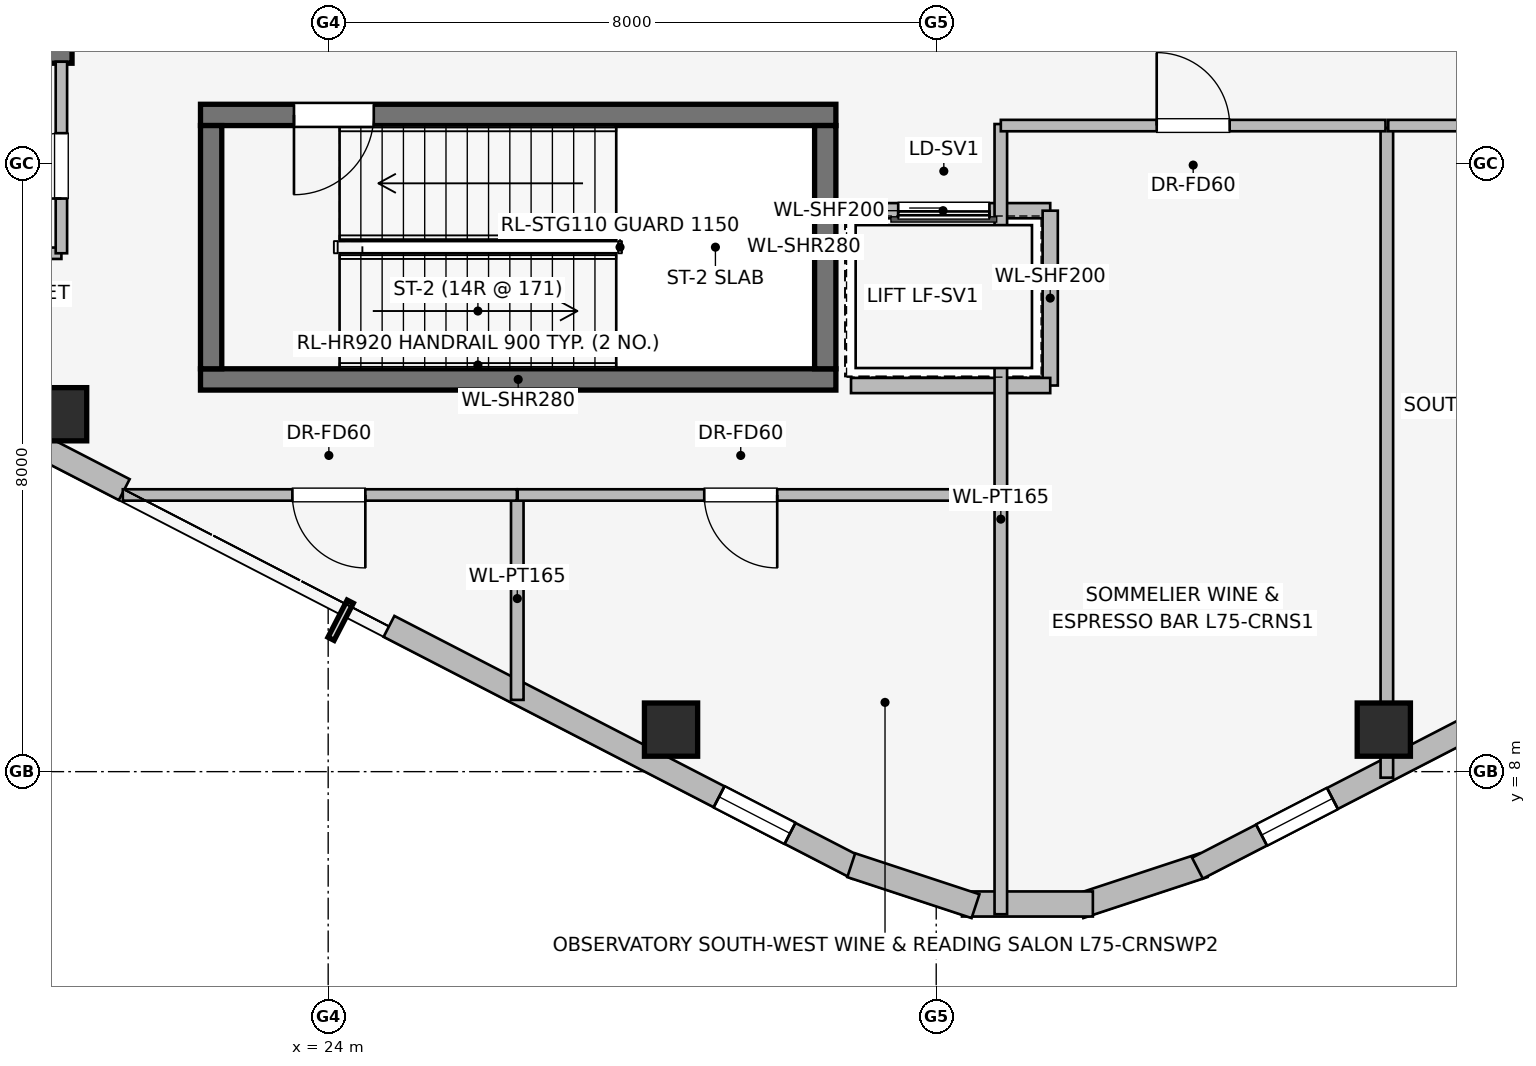
"""IFC4 building model, lengths in metres.
Left out: names, types, materials, properties, quantities, classifications, styles, units other than length and angle.
Written with IfcOpenShell. Run it as: python <this file> out.ifc"""

import sys

from ifc_helpers import new_model, si_unit, direction, frame, frame_2d, origin, origin_2d, place, context, subcontext, project, spatial, rectangle, extrude, element, fill, save


model = new_model("IFC4")
c1 = context("Model", 3, precision=1e-05, world=origin(), true_north=direction((0.0, 1.0)))
c2 = subcontext(c1, "Body", "Model", "MODEL_VIEW")
j1 = project(units=[si_unit("LENGTHUNIT", "METRE"), si_unit("PLANEANGLEUNIT", "RADIAN")], contexts=[c1])
p1 = place(None, origin())
s1 = spatial("IfcSite", under=j1, at=p1, CompositionType="ELEMENT")
p2 = place(p1, origin())
s2 = spatial("IfcBuilding", under=s1, at=p2, CompositionType="ELEMENT")
p3 = place(p2, frame((0.0, 0.0, 275.1)))
s3 = spatial("IfcBuildingStorey", under=s2, at=p3, CompositionType="ELEMENT", Elevation=275.1)
p4 = place(p3, frame((16.87, 17.46, 0.0), z_axis=(0.0, 0.0, 1.0), x_axis=(1.0, 0.0, 0.0)))
e1 = element("IfcWall", 1, at=p4, inside=s3, PredefinedType="SHEAR", context=c2, shape_type="SweptSolid", body=[
    extrude(rectangle(XDim=3.76, YDim=0.28, at=frame_2d((1.88, 0.0))), origin(), (0.0, 0.0, 1.0), 4.8),
])
p5 = place(p3, frame((22.32, 13.16, 0.0), z_axis=(0.0, 0.0, 1.0), x_axis=(1.0, 0.0, 0.0)))
e2 = element("IfcWall", 2, at=p5, inside=s3, PredefinedType="SHEAR", context=c2, shape_type="SweptSolid", body=[
    extrude(rectangle(XDim=8.36, YDim=0.28, at=frame_2d((4.18, 0.0))), origin(), (0.0, 0.0, 1.0), 4.8),
])
p6 = place(p3, frame((30.68, 16.64, 0.0), z_axis=(0.0, 0.0, 1.0), x_axis=(-1.0, 0.0, 0.0)))
e3 = element("IfcWall", 3, at=p6, inside=s3, PredefinedType="SHEAR", context=c2, shape_type="SweptSolid", body=[
    extrude(rectangle(XDim=8.36, YDim=0.28, at=frame_2d((4.18, 0.0))), origin(), (0.0, 0.0, 1.0), 4.8),
])
p7 = place(p6, frame((6.08, 0.0, 0.0)))
e4 = element("IfcOpeningElement", 4, at=p7, cuts=e3, PredefinedType="OPENING", context=c2, shape_type="SweptSolid", body=[
    extrude(rectangle(XDim=1.05, YDim=2.0, at=frame_2d((0.525, 1.0))), frame((0.0, 0.15, 0.0), z_axis=(0.0, -1.0, 0.0), x_axis=(1.0, 0.0, 0.0)), (0.0, 0.0, 1.0), 0.3),
])
for number, where, z_axis, x_axis in (
    (5, (22.46, 16.5, 0.0), (0.0, 0.0, 1.0), (0.0, -1.0, 0.0)),
    (6, (30.54, 13.3, 0.0), (0.0, 0.0, 1.0), (0.0, 1.0, 0.0)),
):
    element("IfcWall", number, at=place(p3, frame(where, z_axis=z_axis, x_axis=x_axis)), inside=s3, PredefinedType="SHEAR", context=c2, shape_type="SweptSolid", body=[
        extrude(rectangle(XDim=3.2, YDim=0.28, at=frame_2d((1.6, 0.0))), origin(), (0.0, 0.0, 1.0), 4.8),
    ])
for number, where, z_axis, x_axis in (
    (7, (20.473, 12.702, 0.0), (0.0, 0.0, 1.0), (1.0, 0.0, 0.0)),
    (8, (28.511, 8.553, 0.0), (0.0, 0.0, 1.0), (1.0, 0.0, 0.0)),
    (9, (37.889, 8.553, 0.0), (0.0, 0.0, 1.0), (1.0, 0.0, 0.0)),
):
    element("IfcColumn", number, at=place(p3, frame(where, z_axis=z_axis, x_axis=x_axis)), inside=s3, PredefinedType="COLUMN", context=c2, shape_type="SweptSolid", body=[
        extrude(rectangle(XDim=0.7, YDim=0.7, at=origin_2d()), origin(), (0.0, 0.0, 1.0), 4.8),
    ])
p8 = place(p3, frame((30.963, 6.73, 0.0), z_axis=(0.0, 0.0, 1.0), x_axis=(-0.888615566095, 0.458652783371, 0.0)))
e10 = element("IfcWall", 10, at=p8, inside=s3, PredefinedType="STANDARD", context=c2, shape_type="SweptSolid", body=[
    extrude(rectangle(XDim=6.935, YDim=0.31, at=frame_2d((3.468, 0.0))), origin(), (0.0, 0.0, 1.0), 4.49),
])
p9 = place(p8, frame((0.998, 0.0, 0.75)))
e11 = element("IfcOpeningElement", 11, at=p9, cuts=e10, PredefinedType="OPENING", context=c2, shape_type="SweptSolid", body=[
    extrude(rectangle(XDim=1.05, YDim=1.4, at=frame_2d((0.525, 0.7))), frame((0.0, 0.165, 0.0), z_axis=(0.0, -1.0, 0.0), x_axis=(1.0, 0.0, 0.0)), (0.0, 0.0, 1.0), 0.33),
])
p10 = place(p3, frame((21.317, 11.71, 0.0), z_axis=(0.0, 0.0, 1.0), x_axis=(-0.888616094641, 0.45865175934, 0.0)))
e12 = element("IfcWall", 12, at=p10, inside=s3, PredefinedType="STANDARD", context=c2, shape_type="SweptSolid", body=[
    extrude(rectangle(XDim=4.221, YDim=0.31, at=frame_2d((2.111, 0.0))), origin(), (0.0, 0.0, 1.0), 4.49),
])
p11 = place(p10, frame((2.173, 0.0, 0.75)))
e13 = element("IfcOpeningElement", 13, at=p11, cuts=e12, PredefinedType="OPENING", context=c2, shape_type="SweptSolid", body=[
    extrude(rectangle(XDim=1.05, YDim=1.4, at=frame_2d((0.525, 0.7))), frame((0.0, 0.165, 0.0), z_axis=(0.0, -1.0, 0.0), x_axis=(1.0, 0.0, 0.0)), (0.0, 0.0, 1.0), 0.33),
])
p12 = place(p3, frame((35.518, 6.769, 0.0), z_axis=(0.0, 0.0, 1.0), x_axis=(-0.949713440491, -0.313120393699, 0.0)))
e14 = element("IfcWall", 14, at=p12, inside=s3, PredefinedType="STANDARD", context=c2, shape_type="SweptSolid", body=[
    extrude(rectangle(XDim=1.722, YDim=0.33, at=frame_2d((0.861, 0.0))), origin(), (0.0, 0.0, 1.0), 4.49),
])
p13 = place(p3, frame((34.061, 6.259, 0.0), z_axis=(0.0, 0.0, 1.0), x_axis=(-1.0, 0.0, 0.0)))
e15 = element("IfcWall", 15, at=p13, inside=s3, PredefinedType="STANDARD", context=c2, shape_type="SweptSolid", body=[
    extrude(rectangle(XDim=1.722, YDim=0.33, at=frame_2d((0.861, 0.0))), origin(), (0.0, 0.0, 1.0), 4.49),
])
p14 = place(p3, frame((32.517, 6.23, 0.0), z_axis=(0.0, 0.0, 1.0), x_axis=(-0.949713440491, 0.313120393699, 0.0)))
e16 = element("IfcWall", 16, at=p14, inside=s3, PredefinedType="STANDARD", context=c2, shape_type="SweptSolid", body=[
    extrude(rectangle(XDim=1.722, YDim=0.33, at=frame_2d((0.861, 0.0))), origin(), (0.0, 0.0, 1.0), 4.49),
])
p15 = place(p3, frame((39.188, 8.666, 0.0), z_axis=(0.0, 0.0, 1.0), x_axis=(-0.888616094641, -0.45865175934, 0.0)))
e17 = element("IfcWall", 17, at=p15, inside=s3, PredefinedType="STANDARD", context=c2, shape_type="SweptSolid", body=[
    extrude(rectangle(XDim=4.221, YDim=0.31, at=frame_2d((2.111, 0.0))), origin(), (0.0, 0.0, 1.0), 4.49),
])
p16 = place(p15, frame((2.222, 0.0, 0.75)))
e18 = element("IfcOpeningElement", 18, at=p16, cuts=e17, PredefinedType="OPENING", context=c2, shape_type="SweptSolid", body=[
    extrude(rectangle(XDim=1.05, YDim=1.4, at=frame_2d((0.525, 0.7))), frame((0.0, 0.165, 0.0), z_axis=(0.0, -1.0, 0.0), x_axis=(1.0, 0.0, 0.0)), (0.0, 0.0, 1.0), 0.33),
])
p17 = place(p3, frame((33.5, 15.38, 0.0), z_axis=(0.0, 0.0, 1.0), x_axis=(-1.0, 0.0, 0.0)))
e19 = element("IfcWall", 19, at=p17, inside=s3, PredefinedType="PARTITIONING", context=c2, shape_type="SweptSolid", body=[
    extrude(rectangle(XDim=2.82, YDim=0.2, at=frame_2d((1.41, 0.0))), origin(), (0.0, 0.0, 1.0), 4.49),
])
p18 = place(p17, frame((0.8, 0.0, 0.0)))
e20 = element("IfcOpeningElement", 20, at=p18, cuts=e19, PredefinedType="OPENING", context=c2, shape_type="SweptSolid", body=[
    extrude(rectangle(XDim=1.2, YDim=2.2, at=frame_2d((0.6, 1.1))), frame((0.0, 0.11, 0.0), z_axis=(0.0, -1.0, 0.0), x_axis=(1.0, 0.0, 0.0)), (0.0, 0.0, 1.0), 0.22),
])
p19 = place(p3, frame((33.5, 13.08, 0.0), z_axis=(0.0, 0.0, 1.0), x_axis=(0.0, 1.0, 0.0)))
e21 = element("IfcWall", 21, at=p19, inside=s3, PredefinedType="PARTITIONING", context=c2, shape_type="SweptSolid", body=[
    extrude(rectangle(XDim=2.3, YDim=0.2, at=frame_2d((1.15, 0.0))), origin(), (0.0, 0.0, 1.0), 4.49),
])
p20 = place(p3, frame((30.879, 13.08, 0.0), z_axis=(0.0, 0.0, 1.0), x_axis=(1.0, 0.0, 0.0)))
e22 = element("IfcWall", 22, at=p20, inside=s3, PredefinedType="PARTITIONING", context=c2, shape_type="SweptSolid", body=[
    extrude(rectangle(XDim=2.621, YDim=0.2, at=frame_2d((1.311, 0.0))), origin(), (0.0, 0.0, 1.0), 4.49),
])
p21 = place(p3, frame((18.1, 14.82, 0.0), z_axis=(0.0, 0.0, 1.0), x_axis=(1.0, 0.0, 0.0)))
e23 = element("IfcWall", 23, at=p21, inside=s3, PredefinedType="PARTITIONING", context=c2, shape_type="SweptSolid", body=[
    extrude(rectangle(XDim=2.39, YDim=0.15, at=frame_2d((1.195, 0.0))), origin(), (0.0, 0.0, 1.0), 4.49),
])
p22 = place(p3, frame((20.49, 14.82, 0.0), z_axis=(0.0, 0.0, 1.0), x_axis=(0.0, 1.0, 0.0)))
e24 = element("IfcWall", 24, at=p22, inside=s3, PredefinedType="PARTITIONING", context=c2, shape_type="SweptSolid", body=[
    extrude(rectangle(XDim=2.52, YDim=0.15, at=frame_2d((1.26, 0.0))), origin(), (0.0, 0.0, 1.0), 4.49),
])
p23 = place(p22, frame((0.72, 0.0, 0.0)))
e25 = element("IfcOpeningElement", 25, at=p23, cuts=e24, PredefinedType="OPENING", context=c2, shape_type="SweptSolid", body=[
    extrude(rectangle(XDim=0.86, YDim=2.0, at=frame_2d((0.43, 1.0))), frame((0.0, 0.085, 0.0), z_axis=(0.0, -1.0, 0.0), x_axis=(1.0, 0.0, 0.0)), (0.0, 0.0, 1.0), 0.17),
])
p24 = place(p3, frame((32.85, 6.124, 0.0), z_axis=(0.0, 0.0, 1.0), x_axis=(0.0, 1.0, 0.0)))
e26 = element("IfcWall", 26, at=p24, inside=s3, PredefinedType="PARTITIONING", context=c2, shape_type="SweptSolid", body=[
    extrude(rectangle(XDim=10.396, YDim=0.165, at=frame_2d((5.198, 0.0))), origin(), (0.0, 0.0, 1.0), 4.49),
])
p25 = place(p3, frame((26.488, 8.944, 0.0), z_axis=(0.0, 0.0, 1.0), x_axis=(0.0, 1.0, 0.0)))
e27 = element("IfcWall", 27, at=p25, inside=s3, PredefinedType="PARTITIONING", context=c2, shape_type="SweptSolid", body=[
    extrude(rectangle(XDim=2.666, YDim=0.165, at=frame_2d((1.333, 0.0))), origin(), (0.0, 0.0, 1.0), 4.49),
])
p26 = place(p3, frame((26.483, 11.64, 0.0), z_axis=(0.0, 0.0, 1.0), x_axis=(-1.0, 0.0, 0.0)))
e28 = element("IfcWall", 28, at=p26, inside=s3, PredefinedType="PARTITIONING", context=c2, shape_type="SweptSolid", body=[
    extrude(rectangle(XDim=5.185, YDim=0.15, at=frame_2d((2.592, 0.0))), origin(), (0.0, 0.0, 1.0), 4.49),
])
p27 = place(p26, frame((1.994, 0.0, 0.0)))
e29 = element("IfcOpeningElement", 29, at=p27, cuts=e28, PredefinedType="OPENING", context=c2, shape_type="SweptSolid", body=[
    extrude(rectangle(XDim=0.96, YDim=2.0, at=frame_2d((0.48, 1.0))), frame((0.0, 0.085, 0.0), z_axis=(0.0, -1.0, 0.0), x_axis=(1.0, 0.0, 0.0)), (0.0, 0.0, 1.0), 0.17),
])
p28 = place(p3, frame((32.773, 11.64, 0.0), z_axis=(0.0, 0.0, 1.0), x_axis=(-1.0, 0.0, 0.0)))
e30 = element("IfcWall", 30, at=p28, inside=s3, PredefinedType="PARTITIONING", context=c2, shape_type="SweptSolid", body=[
    extrude(rectangle(XDim=6.28, YDim=0.15, at=frame_2d((3.14, 0.0))), origin(), (0.0, 0.0, 1.0), 4.49),
])
p29 = place(p28, frame((2.865, 0.0, 0.0)))
e31 = element("IfcOpeningElement", 31, at=p29, cuts=e30, PredefinedType="OPENING", context=c2, shape_type="SweptSolid", body=[
    extrude(rectangle(XDim=0.96, YDim=2.0, at=frame_2d((0.48, 1.0))), frame((0.0, 0.085, 0.0), z_axis=(0.0, -1.0, 0.0), x_axis=(1.0, 0.0, 0.0)), (0.0, 0.0, 1.0), 0.17),
])
p30 = place(p3, frame((37.929, 7.921, 0.0), z_axis=(0.0, 0.0, 1.0), x_axis=(0.0, 1.0, 0.0)))
e32 = element("IfcWall", 32, at=p30, inside=s3, PredefinedType="PARTITIONING", context=c2, shape_type="SweptSolid", body=[
    extrude(rectangle(XDim=8.549, YDim=0.165, at=frame_2d((4.274, 0.0))), origin(), (0.0, 0.0, 1.0), 3.879),
])
p31 = place(p3, frame((32.85, 16.5, 0.0), z_axis=(0.0, 0.0, 1.0), x_axis=(1.0, 0.0, 0.0)))
e33 = element("IfcWall", 33, at=p31, inside=s3, PredefinedType="PARTITIONING", context=c2, shape_type="SweptSolid", body=[
    extrude(rectangle(XDim=5.061, YDim=0.15, at=frame_2d((2.53, 0.0))), origin(), (0.0, 0.0, 1.0), 4.49),
])
p32 = place(p31, frame((2.051, 0.0, 0.0)))
e34 = element("IfcOpeningElement", 34, at=p32, cuts=e33, PredefinedType="OPENING", context=c2, shape_type="SweptSolid", body=[
    extrude(rectangle(XDim=0.96, YDim=2.0, at=frame_2d((0.48, 1.0))), frame((0.0, 0.085, 0.0), z_axis=(0.0, -1.0, 0.0), x_axis=(1.0, 0.0, 0.0)), (0.0, 0.0, 1.0), 0.17),
])
p33 = place(p3, frame((37.947, 16.5, 0.0), z_axis=(0.0, 0.0, 1.0), x_axis=(1.0, 0.0, 0.0)))
e35 = element("IfcWall", 35, at=p33, inside=s3, PredefinedType="PARTITIONING", context=c2, shape_type="SweptSolid", body=[
    extrude(rectangle(XDim=3.453, YDim=0.15, at=frame_2d((1.727, 0.0))), origin(), (0.0, 0.0, 1.0), 4.49),
])
p34 = place(p33, frame((1.247, 0.0, 0.0)))
e36 = element("IfcOpeningElement", 36, at=p34, cuts=e35, PredefinedType="OPENING", context=c2, shape_type="SweptSolid", body=[
    extrude(rectangle(XDim=0.96, YDim=2.0, at=frame_2d((0.48, 1.0))), frame((0.0, 0.085, 0.0), z_axis=(0.0, -1.0, 0.0), x_axis=(1.0, 0.0, 0.0)), (0.0, 0.0, 1.0), 0.17),
])
p35 = place(p9, origin())
e37 = element("IfcWindow", 37, at=p35, inside=s3, PartitioningType="SINGLE_PANEL", PredefinedType="WINDOW", context=c2, shape_type="SweptSolid", body=[
    extrude(rectangle(XDim=1.05, YDim=1.4, at=frame_2d((0.525, 0.7))), frame((0.0, 0.03, 0.0), z_axis=(0.0, -1.0, 0.0), x_axis=(1.0, 0.0, 0.0)), (0.0, 0.0, 1.0), 0.06),
])
fill(e11, e37)
p36 = place(p16, origin())
e38 = element("IfcWindow", 38, at=p36, inside=s3, PartitioningType="SINGLE_PANEL", PredefinedType="WINDOW", context=c2, shape_type="SweptSolid", body=[
    extrude(rectangle(XDim=1.05, YDim=1.4, at=frame_2d((0.525, 0.7))), frame((0.0, 0.03, 0.0), z_axis=(0.0, -1.0, 0.0), x_axis=(1.0, 0.0, 0.0)), (0.0, 0.0, 1.0), 0.06),
])
fill(e18, e38)
p37 = place(p7, origin())
e39 = element("IfcDoor", 39, at=p37, inside=s3, OperationType="SINGLE_SWING_RIGHT", PredefinedType="DOOR", context=c2, shape_type="SweptSolid", body=[
    extrude(rectangle(XDim=1.05, YDim=2.0, at=frame_2d((0.525, 1.0))), frame((0.0, 0.025, 0.0), z_axis=(0.0, -1.0, 0.0), x_axis=(1.0, 0.0, 0.0)), (0.0, 0.0, 1.0), 0.05),
])
fill(e4, e39)
p38 = place(p18, origin())
e40 = element("IfcDoor", 40, at=p38, inside=s3, OperationType="SLIDING_TO_RIGHT", PredefinedType="DOOR", context=c2, shape_type="SweptSolid", body=[
    extrude(rectangle(XDim=1.2, YDim=2.2, at=frame_2d((0.6, 1.1))), frame((0.0, 0.025, 0.0), z_axis=(0.0, -1.0, 0.0), x_axis=(1.0, 0.0, 0.0)), (0.0, 0.0, 1.0), 0.05),
])
fill(e20, e40)
p39 = place(p23, origin())
e41 = element("IfcDoor", 41, at=p39, inside=s3, OperationType="SINGLE_SWING_LEFT", PredefinedType="DOOR", context=c2, shape_type="SweptSolid", body=[
    extrude(rectangle(XDim=0.86, YDim=2.0, at=frame_2d((0.43, 1.0))), frame((0.0, 0.025, 0.0), z_axis=(0.0, -1.0, 0.0), x_axis=(1.0, 0.0, 0.0)), (0.0, 0.0, 1.0), 0.05),
])
fill(e25, e41)
p40 = place(p27, origin())
e42 = element("IfcDoor", 42, at=p40, inside=s3, OperationType="SINGLE_SWING_LEFT", PredefinedType="DOOR", context=c2, shape_type="SweptSolid", body=[
    extrude(rectangle(XDim=0.96, YDim=2.0, at=frame_2d((0.48, 1.0))), frame((0.0, 0.025, 0.0), z_axis=(0.0, -1.0, 0.0), x_axis=(1.0, 0.0, 0.0)), (0.0, 0.0, 1.0), 0.05),
])
fill(e29, e42)
p41 = place(p29, origin())
e43 = element("IfcDoor", 43, at=p41, inside=s3, OperationType="SINGLE_SWING_LEFT", PredefinedType="DOOR", context=c2, shape_type="SweptSolid", body=[
    extrude(rectangle(XDim=0.96, YDim=2.0, at=frame_2d((0.48, 1.0))), frame((0.0, 0.025, 0.0), z_axis=(0.0, -1.0, 0.0), x_axis=(1.0, 0.0, 0.0)), (0.0, 0.0, 1.0), 0.05),
])
fill(e31, e43)
p42 = place(p32, origin())
e44 = element("IfcDoor", 44, at=p42, inside=s3, OperationType="SINGLE_SWING_LEFT", PredefinedType="DOOR", context=c2, shape_type="SweptSolid", body=[
    extrude(rectangle(XDim=0.96, YDim=2.0, at=frame_2d((0.48, 1.0))), frame((0.0, 0.025, 0.0), z_axis=(0.0, -1.0, 0.0), x_axis=(1.0, 0.0, 0.0)), (0.0, 0.0, 1.0), 0.05),
])
fill(e34, e44)
save(model, sys.argv[1])
